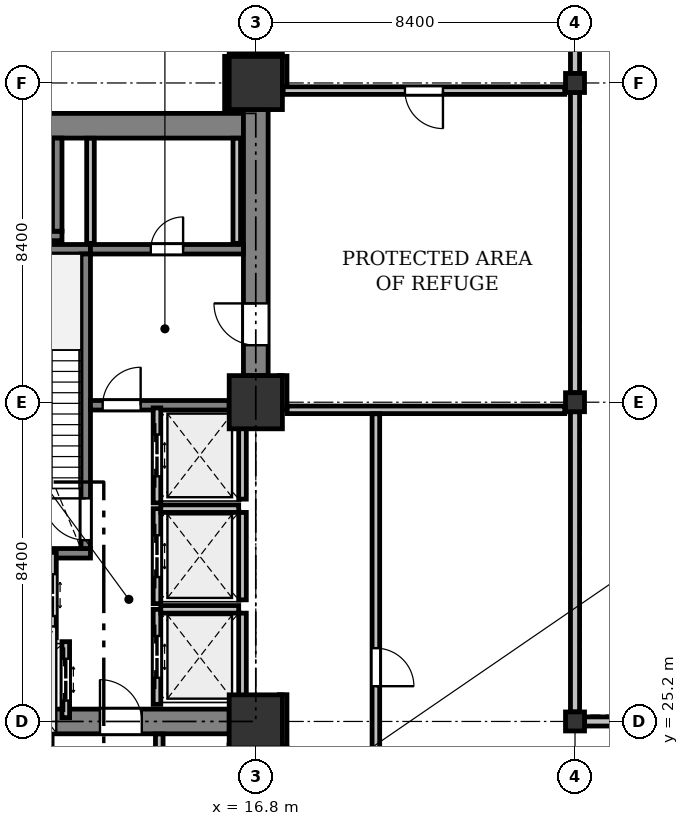
"""IFC4 building model, lengths in metres.
Left out: names, types, materials, properties, quantities, classifications, styles, units other than length and angle.
Written with IfcOpenShell. Run it as: python <this file> out.ifc"""

import sys

from ifc_helpers import new_model, si_unit, direction, frame, frame_2d, origin, origin_2d, place, context, subcontext, project, spatial, rectangle, i_section, extrude, element, fill, save


model = new_model("IFC4")
c1 = context("Model", 3, precision=1e-05, world=origin(), true_north=direction((0.0, 1.0)))
c2 = subcontext(c1, "Body", "Model", "MODEL_VIEW")
j1 = project(units=[si_unit("LENGTHUNIT", "METRE"), si_unit("PLANEANGLEUNIT", "RADIAN")], contexts=[c1])
p1 = place(None, origin())
s1 = spatial("IfcSite", under=j1, at=p1, CompositionType="ELEMENT")
p2 = place(p1, origin())
s2 = spatial("IfcBuilding", under=s1, at=p2, CompositionType="ELEMENT")
p3 = place(p2, frame((0.0, 0.0, 79.4)))
s3 = spatial("IfcBuildingStorey", under=s2, at=p3, CompositionType="ELEMENT", Elevation=79.4)
for number, where, z_axis, x_axis in (
    (1, (16.8, 25.2, 0.0), (0.0, 0.0, 1.0), (1.0, 0.0, 0.0)),
    (2, (16.8, 33.6, 0.0), (0.0, 0.0, 1.0), (1.0, 0.0, 0.0)),
    (3, (16.8, 42.0, 0.0), (0.0, 0.0, 1.0), (1.0, 0.0, 0.0)),
):
    element("IfcColumn", number, at=place(p3, frame(where, z_axis=z_axis, x_axis=x_axis)), inside=s3, PredefinedType="COLUMN", context=c2, shape_type="SweptSolid", body=[
        extrude(rectangle(XDim=1.4, YDim=1.4, at=origin_2d()), origin(), (0.0, 0.0, 1.0), 5.0),
    ])
for number, where, z_axis, x_axis in (
    (4, (25.2, 25.2, 0.0), (0.0, 0.0, 1.0), (1.0, 0.0, 0.0)),
    (5, (25.2, 33.6, 0.0), (0.0, 0.0, 1.0), (1.0, 0.0, 0.0)),
    (6, (25.2, 42.0, 0.0), (0.0, 0.0, 1.0), (1.0, 0.0, 0.0)),
):
    element("IfcColumn", number, at=place(p3, frame(where, z_axis=z_axis, x_axis=x_axis)), inside=s3, PredefinedType="COLUMN", context=c2, shape_type="SweptSolid", body=[
        extrude(i_section(OverallWidth=0.5, OverallDepth=0.5, WebThickness=0.028, FlangeThickness=0.04, at=origin_2d()), origin(), (0.0, 0.0, 1.0), 5.0),
    ])
p4 = place(p3, frame((25.2, 46.08, 0.0), z_axis=(0.0, 0.0, 1.0), x_axis=(0.0, -1.0, 0.0)))
e7 = element("IfcWall", 7, at=p4, inside=s3, PredefinedType="STANDARD", context=c2, shape_type="SweptSolid", body=[
    extrude(rectangle(XDim=3.83, YDim=0.24, at=frame_2d((1.915, 0.0))), origin(), (0.0, 0.0, 1.0), 4.725),
])
p5 = place(p3, frame((25.2, 41.75, 0.0), z_axis=(0.0, 0.0, 1.0), x_axis=(0.0, -1.0, 0.0)))
e8 = element("IfcWall", 8, at=p5, inside=s3, PredefinedType="STANDARD", context=c2, shape_type="SweptSolid", body=[
    extrude(rectangle(XDim=7.9, YDim=0.24, at=frame_2d((3.95, 0.0))), origin(), (0.0, 0.0, 1.0), 3.709),
])
p6 = place(p3, frame((25.2, 33.35, 0.0), z_axis=(0.0, 0.0, 1.0), x_axis=(0.0, -1.0, 0.0)))
e9 = element("IfcWall", 9, at=p6, inside=s3, PredefinedType="STANDARD", context=c2, shape_type="SweptSolid", body=[
    extrude(rectangle(XDim=7.9, YDim=0.24, at=frame_2d((3.95, 0.0))), origin(), (0.0, 0.0, 1.0), 3.709),
])
p7 = place(p3, frame((25.45, 25.2, 0.0), z_axis=(0.0, 0.0, 1.0), x_axis=(1.0, 0.0, 0.0)))
e10 = element("IfcWall", 10, at=p7, inside=s3, PredefinedType="STANDARD", context=c2, shape_type="SweptSolid", body=[
    extrude(rectangle(XDim=7.9, YDim=0.24, at=frame_2d((3.95, 0.0))), origin(), (0.0, 0.0, 1.0), 3.825),
])
p8 = place(p3, frame((8.725, 40.875, 0.0), z_axis=(0.0, 0.0, 1.0), x_axis=(1.0, 0.0, 0.0)))
e11 = element("IfcWall", 11, at=p8, inside=s3, PredefinedType="SHEAR", context=c2, shape_type="SweptSolid", body=[
    extrude(rectangle(XDim=7.75, YDim=0.65, at=frame_2d((3.875, 0.0))), origin(), (0.0, 0.0, 1.0), 4.725),
])
p9 = place(p3, frame((16.8, 34.3, 0.0), z_axis=(0.0, 0.0, 1.0), x_axis=(0.0, 1.0, 0.0)))
e12 = element("IfcWall", 12, at=p9, inside=s3, PredefinedType="SHEAR", context=c2, shape_type="SweptSolid", body=[
    extrude(rectangle(XDim=7.0, YDim=0.65, at=frame_2d((3.5, 0.0))), origin(), (0.0, 0.0, 1.0), 4.725),
])
p10 = place(p9, frame((0.8, 0.0, 0.0)))
e13 = element("IfcOpeningElement", 13, at=p10, cuts=e12, PredefinedType="OPENING", context=c2, shape_type="SweptSolid", body=[
    extrude(rectangle(XDim=1.1, YDim=2.15, at=frame_2d((0.55, 1.075))), frame((0.0, 0.335, 0.0), z_axis=(0.0, -1.0, 0.0), x_axis=(1.0, 0.0, 0.0)), (0.0, 0.0, 1.0), 0.67),
])
p11 = place(p3, frame((9.1, 25.2, 0.0), z_axis=(0.0, 0.0, 1.0), x_axis=(1.0, 0.0, 0.0)))
e14 = element("IfcWall", 14, at=p11, inside=s3, PredefinedType="SHEAR", context=c2, shape_type="SweptSolid", body=[
    extrude(rectangle(XDim=7.0, YDim=0.65, at=frame_2d((3.5, 0.0))), origin(), (0.0, 0.0, 1.0), 4.725),
])
p12 = place(p11, frame((3.6, 0.0, 0.0)))
e15 = element("IfcOpeningElement", 15, at=p12, cuts=e14, PredefinedType="OPENING", context=c2, shape_type="SweptSolid", body=[
    extrude(rectangle(XDim=1.1, YDim=2.15, at=frame_2d((0.55, 1.075))), frame((0.0, 0.335, 0.0), z_axis=(0.0, -1.0, 0.0), x_axis=(1.0, 0.0, 0.0)), (0.0, 0.0, 1.0), 0.67),
])
for number, where, z_axis, x_axis in (
    (16, (12.45, 29.625, 0.0), (0.0, 0.0, 1.0), (-1.0, 0.0, 0.0)),
    (17, (12.45, 37.625, 0.0), (0.0, 0.0, 1.0), (-1.0, 0.0, 0.0)),
):
    element("IfcWall", number, at=place(p3, frame(where, z_axis=z_axis, x_axis=x_axis)), inside=s3, PredefinedType="SHEAR", context=c2, shape_type="SweptSolid", body=[
        extrude(rectangle(XDim=3.75, YDim=0.25, at=frame_2d((1.875, 0.0))), origin(), (0.0, 0.0, 1.0), 4.725),
    ])
p13 = place(p3, frame((12.325, 29.75, 0.0), z_axis=(0.0, 0.0, 1.0), x_axis=(0.0, 1.0, 0.0)))
e18 = element("IfcWall", 18, at=p13, inside=s3, PredefinedType="SHEAR", context=c2, shape_type="SweptSolid", body=[
    extrude(rectangle(XDim=7.75, YDim=0.25, at=frame_2d((3.875, 0.0))), origin(), (0.0, 0.0, 1.0), 4.725),
])
p14 = place(p13, frame((0.22, 0.0, 0.0)))
e19 = element("IfcOpeningElement", 19, at=p14, cuts=e18, PredefinedType="OPENING", context=c2, shape_type="SweptSolid", body=[
    extrude(rectangle(XDim=1.1, YDim=2.15, at=frame_2d((0.55, 1.075))), frame((0.0, 0.135, 0.0), z_axis=(0.0, -1.0, 0.0), x_axis=(1.0, 0.0, 0.0)), (0.0, 0.0, 1.0), 0.27),
])
p15 = place(p3, frame((8.725, 37.975, 0.0), z_axis=(0.0, 0.0, 1.0), x_axis=(1.0, 0.0, 0.0)))
e20 = element("IfcWall", 20, at=p15, inside=s3, PredefinedType="SHEAR", context=c2, shape_type="SweptSolid", body=[
    extrude(rectangle(XDim=2.975, YDim=0.25, at=frame_2d((1.487, 0.0))), origin(), (0.0, 0.0, 1.0), 4.725),
])
p16 = place(p3, frame((11.575, 38.1, 0.0), z_axis=(0.0, 0.0, 1.0), x_axis=(0.0, 1.0, 0.0)))
e21 = element("IfcWall", 21, at=p16, inside=s3, PredefinedType="SHEAR", context=c2, shape_type="SweptSolid", body=[
    extrude(rectangle(XDim=2.45, YDim=0.25, at=frame_2d((1.225, 0.0))), origin(), (0.0, 0.0, 1.0), 4.725),
])
p17 = place(p3, frame((12.45, 33.52, 0.0), z_axis=(0.0, 0.0, 1.0), x_axis=(1.0, 0.0, 0.0)))
e22 = element("IfcWall", 22, at=p17, inside=s3, PredefinedType="SHEAR", context=c2, shape_type="SweptSolid", body=[
    extrude(rectangle(XDim=3.65, YDim=0.25, at=frame_2d((1.825, 0.0))), origin(), (0.0, 0.0, 1.0), 4.725),
])
p18 = place(p17, frame((0.32, 0.0, 0.0)))
e23 = element("IfcOpeningElement", 23, at=p18, cuts=e22, PredefinedType="OPENING", context=c2, shape_type="SweptSolid", body=[
    extrude(rectangle(XDim=1.0, YDim=2.15, at=frame_2d((0.5, 1.075))), frame((0.0, 0.135, 0.0), z_axis=(0.0, -1.0, 0.0), x_axis=(1.0, 0.0, 0.0)), (0.0, 0.0, 1.0), 0.27),
])
p19 = place(p3, frame((12.45, 37.625, 0.0), z_axis=(0.0, 0.0, 1.0), x_axis=(1.0, 0.0, 0.0)))
e24 = element("IfcWall", 24, at=p19, inside=s3, PredefinedType="SHEAR", context=c2, shape_type="SweptSolid", body=[
    extrude(rectangle(XDim=4.025, YDim=0.25, at=frame_2d((2.013, 0.0))), origin(), (0.0, 0.0, 1.0), 4.725),
])
p20 = place(p19, frame((1.587, 0.0, 0.0)))
e25 = element("IfcOpeningElement", 25, at=p20, cuts=e24, PredefinedType="OPENING", context=c2, shape_type="SweptSolid", body=[
    extrude(rectangle(XDim=0.85, YDim=2.15, at=frame_2d((0.425, 1.075))), frame((0.0, 0.135, 0.0), z_axis=(0.0, -1.0, 0.0), x_axis=(1.0, 0.0, 0.0)), (0.0, 0.0, 1.0), 0.27),
])
p21 = place(p3, frame((11.45, 27.4, 0.0), z_axis=(0.0, 0.0, 1.0), x_axis=(0.0, 1.0, 0.0)))
e26 = element("IfcWall", 26, at=p21, inside=s3, PredefinedType="PARTITIONING", context=c2, shape_type="SweptSolid", body=[
    extrude(rectangle(XDim=2.25, YDim=0.2, at=frame_2d((1.125, 0.0))), origin(), (0.0, 0.0, 1.0), 4.725),
])
p22 = place(p21, frame((0.575, 0.0, 0.0)))
e27 = element("IfcOpeningElement", 27, at=p22, cuts=e26, PredefinedType="OPENING", context=c2, shape_type="SweptSolid", body=[
    extrude(rectangle(XDim=1.1, YDim=2.2, at=frame_2d((0.55, 1.1))), frame((0.0, 0.11, 0.0), z_axis=(0.0, -1.0, 0.0), x_axis=(1.0, 0.0, 0.0)), (0.0, 0.0, 1.0), 0.22),
])
p23 = place(p3, frame((11.8, 25.3, 0.0), z_axis=(0.0, 0.0, 1.0), x_axis=(0.0, 1.0, 0.0)))
e28 = element("IfcWall", 28, at=p23, inside=s3, PredefinedType="PARTITIONING", context=c2, shape_type="SweptSolid", body=[
    extrude(rectangle(XDim=2.0, YDim=0.2, at=frame_2d((1.0, 0.0))), origin(), (0.0, 0.0, 1.0), 4.725),
])
p24 = place(p23, frame((0.45, 0.0, 0.0)))
e29 = element("IfcOpeningElement", 29, at=p24, cuts=e28, PredefinedType="OPENING", context=c2, shape_type="SweptSolid", body=[
    extrude(rectangle(XDim=1.1, YDim=2.2, at=frame_2d((0.55, 1.1))), frame((0.0, 0.11, 0.0), z_axis=(0.0, -1.0, 0.0), x_axis=(1.0, 0.0, 0.0)), (0.0, 0.0, 1.0), 0.22),
])
p25 = place(p3, frame((14.2, 25.65, 0.0), z_axis=(0.0, 0.0, 1.0), x_axis=(0.0, 1.0, 0.0)))
e30 = element("IfcWall", 30, at=p25, inside=s3, PredefinedType="PARTITIONING", context=c2, shape_type="SweptSolid", body=[
    extrude(rectangle(XDim=2.5, YDim=0.2, at=frame_2d((1.25, 0.0))), origin(), (0.0, 0.0, 1.0), 4.725),
])
p26 = place(p25, frame((0.7, 0.0, 0.0)))
e31 = element("IfcOpeningElement", 31, at=p26, cuts=e30, PredefinedType="OPENING", context=c2, shape_type="SweptSolid", body=[
    extrude(rectangle(XDim=1.1, YDim=2.2, at=frame_2d((0.55, 1.1))), frame((0.0, 0.11, 0.0), z_axis=(0.0, -1.0, 0.0), x_axis=(1.0, 0.0, 0.0)), (0.0, 0.0, 1.0), 0.22),
])
p27 = place(p3, frame((16.45, 25.75, 0.0), z_axis=(0.0, 0.0, 1.0), x_axis=(0.0, 1.0, 0.0)))
e32 = element("IfcWall", 32, at=p27, inside=s3, PredefinedType="PARTITIONING", context=c2, shape_type="SweptSolid", body=[
    extrude(rectangle(XDim=2.3, YDim=0.2, at=frame_2d((1.15, 0.0))), origin(), (0.0, 0.0, 1.0), 4.725),
])
p28 = place(p3, frame((14.3, 28.15, 0.0), z_axis=(0.0, 0.0, 1.0), x_axis=(1.0, 0.0, 0.0)))
e33 = element("IfcWall", 33, at=p28, inside=s3, PredefinedType="PARTITIONING", context=c2, shape_type="SweptSolid", body=[
    extrude(rectangle(XDim=2.05, YDim=0.2, at=frame_2d((1.025, 0.0))), origin(), (0.0, 0.0, 1.0), 4.725),
])
p29 = place(p3, frame((14.2, 28.3, 0.0), z_axis=(0.0, 0.0, 1.0), x_axis=(0.0, 1.0, 0.0)))
e34 = element("IfcWall", 34, at=p29, inside=s3, PredefinedType="PARTITIONING", context=c2, shape_type="SweptSolid", body=[
    extrude(rectangle(XDim=2.5, YDim=0.2, at=frame_2d((1.25, 0.0))), origin(), (0.0, 0.0, 1.0), 4.725),
])
p30 = place(p29, frame((0.7, 0.0, 0.0)))
e35 = element("IfcOpeningElement", 35, at=p30, cuts=e34, PredefinedType="OPENING", context=c2, shape_type="SweptSolid", body=[
    extrude(rectangle(XDim=1.1, YDim=2.2, at=frame_2d((0.55, 1.1))), frame((0.0, 0.11, 0.0), z_axis=(0.0, -1.0, 0.0), x_axis=(1.0, 0.0, 0.0)), (0.0, 0.0, 1.0), 0.22),
])
p31 = place(p3, frame((16.45, 28.4, 0.0), z_axis=(0.0, 0.0, 1.0), x_axis=(0.0, 1.0, 0.0)))
e36 = element("IfcWall", 36, at=p31, inside=s3, PredefinedType="PARTITIONING", context=c2, shape_type="SweptSolid", body=[
    extrude(rectangle(XDim=2.3, YDim=0.2, at=frame_2d((1.15, 0.0))), origin(), (0.0, 0.0, 1.0), 4.725),
])
p32 = place(p3, frame((14.3, 30.8, 0.0), z_axis=(0.0, 0.0, 1.0), x_axis=(1.0, 0.0, 0.0)))
e37 = element("IfcWall", 37, at=p32, inside=s3, PredefinedType="PARTITIONING", context=c2, shape_type="SweptSolid", body=[
    extrude(rectangle(XDim=2.05, YDim=0.2, at=frame_2d((1.025, 0.0))), origin(), (0.0, 0.0, 1.0), 4.725),
])
p33 = place(p3, frame((14.2, 30.95, 0.0), z_axis=(0.0, 0.0, 1.0), x_axis=(0.0, 1.0, 0.0)))
e38 = element("IfcWall", 38, at=p33, inside=s3, PredefinedType="PARTITIONING", context=c2, shape_type="SweptSolid", body=[
    extrude(rectangle(XDim=2.5, YDim=0.2, at=frame_2d((1.25, 0.0))), origin(), (0.0, 0.0, 1.0), 4.725),
])
p34 = place(p33, frame((0.7, 0.0, 0.0)))
e39 = element("IfcOpeningElement", 39, at=p34, cuts=e38, PredefinedType="OPENING", context=c2, shape_type="SweptSolid", body=[
    extrude(rectangle(XDim=1.1, YDim=2.2, at=frame_2d((0.55, 1.1))), frame((0.0, 0.11, 0.0), z_axis=(0.0, -1.0, 0.0), x_axis=(1.0, 0.0, 0.0)), (0.0, 0.0, 1.0), 0.22),
])
p35 = place(p3, frame((16.45, 31.05, 0.0), z_axis=(0.0, 0.0, 1.0), x_axis=(0.0, 1.0, 0.0)))
e40 = element("IfcWall", 40, at=p35, inside=s3, PredefinedType="PARTITIONING", context=c2, shape_type="SweptSolid", body=[
    extrude(rectangle(XDim=2.3, YDim=0.2, at=frame_2d((1.15, 0.0))), origin(), (0.0, 0.0, 1.0), 4.725),
])
for number, where, z_axis, x_axis in (
    (41, (16.3, 37.78, 0.0), (0.0, 0.0, 1.0), (0.0, 1.0, 0.0)),
    (42, (12.45, 40.546, 0.0), (0.0, 0.0, 1.0), (0.0, -1.0, 0.0)),
):
    element("IfcWall", number, at=place(p3, frame(where, z_axis=z_axis, x_axis=x_axis)), inside=s3, PredefinedType="PARTITIONING", context=c2, shape_type="SweptSolid", body=[
        extrude(rectangle(XDim=2.766, YDim=0.2, at=frame_2d((1.383, 0.0))), origin(), (0.0, 0.0, 1.0), 3.625),
    ])
p36 = place(p3, frame((17.52, 34.3, 0.0), z_axis=(0.0, 0.0, 1.0), x_axis=(0.0, -1.0, 0.0)))
e43 = element("IfcWall", 43, at=p36, inside=s3, PredefinedType="PARTITIONING", context=c2, shape_type="SweptSolid", body=[
    extrude(rectangle(XDim=0.9, YDim=0.2, at=frame_2d((0.45, 0.0))), origin(), (0.0, 0.0, 1.0), 3.825),
])
p37 = place(p3, frame((17.624, 33.4, 0.0), z_axis=(0.0, 0.0, 1.0), x_axis=(1.0, 0.0, 0.0)))
e44 = element("IfcWall", 44, at=p37, inside=s3, PredefinedType="PARTITIONING", context=c2, shape_type="SweptSolid", body=[
    extrude(rectangle(XDim=7.306, YDim=0.2, at=frame_2d((3.653, 0.0))), origin(), (0.0, 0.0, 1.0), 3.825),
])
p38 = place(p3, frame((24.93, 41.8, 0.0), z_axis=(0.0, 0.0, 1.0), x_axis=(-1.0, 0.0, 0.0)))
e45 = element("IfcWall", 45, at=p38, inside=s3, PredefinedType="PARTITIONING", context=c2, shape_type="SweptSolid", body=[
    extrude(rectangle(XDim=7.41, YDim=0.2, at=frame_2d((3.705, 0.0))), origin(), (0.0, 0.0, 1.0), 3.825),
])
p39 = place(p38, frame((3.205, 0.0, 0.0)))
e46 = element("IfcOpeningElement", 46, at=p39, cuts=e45, PredefinedType="OPENING", context=c2, shape_type="SweptSolid", body=[
    extrude(rectangle(XDim=1.0, YDim=2.15, at=frame_2d((0.5, 1.075))), frame((0.0, 0.11, 0.0), z_axis=(0.0, -1.0, 0.0), x_axis=(1.0, 0.0, 0.0)), (0.0, 0.0, 1.0), 0.22),
])
p40 = place(p3, frame((16.08, 41.3, 0.0), z_axis=(0.0, 0.0, 1.0), x_axis=(0.0, 1.0, 0.0)))
e47 = element("IfcWall", 47, at=p40, inside=s3, PredefinedType="PARTITIONING", context=c2, shape_type="SweptSolid", body=[
    extrude(rectangle(XDim=1.4, YDim=0.2, at=frame_2d((0.7, 0.0))), origin(), (0.0, 0.0, 1.0), 3.825),
])
p41 = place(p3, frame((16.1, 42.72, 0.0), z_axis=(0.0, 0.0, 1.0), x_axis=(1.0, 0.0, 0.0)))
e48 = element("IfcWall", 48, at=p41, inside=s3, PredefinedType="PARTITIONING", context=c2, shape_type="SweptSolid", body=[
    extrude(rectangle(XDim=1.4, YDim=0.2, at=frame_2d((0.7, 0.0))), origin(), (0.0, 0.0, 1.0), 3.709),
])
p42 = place(p3, frame((17.52, 42.7, 0.0), z_axis=(0.0, 0.0, 1.0), x_axis=(0.0, -1.0, 0.0)))
e49 = element("IfcWall", 49, at=p42, inside=s3, PredefinedType="PARTITIONING", context=c2, shape_type="SweptSolid", body=[
    extrude(rectangle(XDim=0.796, YDim=0.2, at=frame_2d((0.398, 0.0))), origin(), (0.0, 0.0, 1.0), 3.825),
])
p43 = place(p3, frame((19.96, 33.296, 0.0), z_axis=(0.0, 0.0, 1.0), x_axis=(0.0, -1.0, 0.0)))
e50 = element("IfcWall", 50, at=p43, inside=s3, PredefinedType="PARTITIONING", context=c2, shape_type="SweptSolid", body=[
    extrude(rectangle(XDim=13.336, YDim=0.2, at=frame_2d((6.668, 0.0))), origin(), (0.0, 0.0, 1.0), 3.825),
])
p44 = place(p43, frame((6.168, 0.0, 0.0)))
e51 = element("IfcOpeningElement", 51, at=p44, cuts=e50, PredefinedType="OPENING", context=c2, shape_type="SweptSolid", body=[
    extrude(rectangle(XDim=1.0, YDim=2.15, at=frame_2d((0.5, 1.075))), frame((0.0, 0.11, 0.0), z_axis=(0.0, -1.0, 0.0), x_axis=(1.0, 0.0, 0.0)), (0.0, 0.0, 1.0), 0.22),
])
p45 = place(p3, frame((17.52, 25.904, 0.0), z_axis=(0.0, 0.0, 1.0), x_axis=(0.000347826066, -0.999999939509, 0.0)))
e52 = element("IfcWall", 52, at=p45, inside=s3, PredefinedType="PARTITIONING", context=c2, shape_type="SweptSolid", body=[
    extrude(rectangle(XDim=1.404, YDim=0.2, at=frame_2d((0.702, 0.0))), origin(), (0.0, 0.0, 1.0), 3.825),
])
p46 = place(p3, frame((17.5, 24.48, 0.0), z_axis=(0.0, 0.0, 1.0), x_axis=(-0.999999758706, 0.000694685487, 0.0)))
e53 = element("IfcWall", 53, at=p46, inside=s3, PredefinedType="PARTITIONING", context=c2, shape_type="SweptSolid", body=[
    extrude(rectangle(XDim=1.406, YDim=0.2, at=frame_2d((0.703, 0.0))), origin(), (0.0, 0.0, 1.0), 3.709),
])
p47 = place(p3, frame((14.26, 24.871, 0.0), z_axis=(0.0, 0.0, 1.0), x_axis=(0.0, -1.0, 0.0)))
e54 = element("IfcWall", 54, at=p47, inside=s3, PredefinedType="PARTITIONING", context=c2, shape_type="SweptSolid", body=[
    extrude(rectangle(XDim=4.911, YDim=0.2, at=frame_2d((2.456, 0.0))), origin(), (0.0, 0.0, 1.0), 4.725),
])
p48 = place(p47, frame((1.956, 0.0, 0.0)))
e55 = element("IfcOpeningElement", 55, at=p48, cuts=e54, PredefinedType="OPENING", context=c2, shape_type="SweptSolid", body=[
    extrude(rectangle(XDim=1.0, YDim=2.15, at=frame_2d((0.5, 1.075))), frame((0.0, 0.11, 0.0), z_axis=(0.0, -1.0, 0.0), x_axis=(1.0, 0.0, 0.0)), (0.0, 0.0, 1.0), 0.22),
])
p49 = place(p10, origin())
e56 = element("IfcDoor", 56, at=p49, inside=s3, OperationType="SINGLE_SWING_RIGHT", PredefinedType="DOOR", context=c2, shape_type="SweptSolid", body=[
    extrude(rectangle(XDim=1.1, YDim=2.15, at=frame_2d((0.55, 1.075))), frame((0.0, 0.025, 0.0), z_axis=(0.0, -1.0, 0.0), x_axis=(1.0, 0.0, 0.0)), (0.0, 0.0, 1.0), 0.05),
])
fill(e13, e56)
p50 = place(p12, origin())
e57 = element("IfcDoor", 57, at=p50, inside=s3, OperationType="SINGLE_SWING_LEFT", PredefinedType="DOOR", context=c2, shape_type="SweptSolid", body=[
    extrude(rectangle(XDim=1.1, YDim=2.15, at=frame_2d((0.55, 1.075))), frame((0.0, 0.025, 0.0), z_axis=(0.0, -1.0, 0.0), x_axis=(1.0, 0.0, 0.0)), (0.0, 0.0, 1.0), 0.05),
])
fill(e15, e57)
p51 = place(p14, origin())
e58 = element("IfcDoor", 58, at=p51, inside=s3, OperationType="SINGLE_SWING_RIGHT", PredefinedType="DOOR", context=c2, shape_type="SweptSolid", body=[
    extrude(rectangle(XDim=1.1, YDim=2.15, at=frame_2d((0.55, 1.075))), frame((0.0, 0.025, 0.0), z_axis=(0.0, -1.0, 0.0), x_axis=(1.0, 0.0, 0.0)), (0.0, 0.0, 1.0), 0.05),
])
fill(e19, e58)
p52 = place(p18, origin())
e59 = element("IfcDoor", 59, at=p52, inside=s3, OperationType="SINGLE_SWING_RIGHT", PredefinedType="DOOR", context=c2, shape_type="SweptSolid", body=[
    extrude(rectangle(XDim=1.0, YDim=2.15, at=frame_2d((0.5, 1.075))), frame((0.0, 0.025, 0.0), z_axis=(0.0, -1.0, 0.0), x_axis=(1.0, 0.0, 0.0)), (0.0, 0.0, 1.0), 0.05),
])
fill(e23, e59)
p53 = place(p22, origin())
e60 = element("IfcDoor", 60, at=p53, inside=s3, OperationType="DOUBLE_DOOR_SLIDING", PredefinedType="DOOR", context=c2, shape_type="SweptSolid", body=[
    extrude(rectangle(XDim=1.1, YDim=2.2, at=frame_2d((0.55, 1.1))), frame((0.0, 0.025, 0.0), z_axis=(0.0, -1.0, 0.0), x_axis=(1.0, 0.0, 0.0)), (0.0, 0.0, 1.0), 0.05),
])
fill(e27, e60)
p54 = place(p24, origin())
e61 = element("IfcDoor", 61, at=p54, inside=s3, OperationType="DOUBLE_DOOR_SLIDING", PredefinedType="DOOR", context=c2, shape_type="SweptSolid", body=[
    extrude(rectangle(XDim=1.1, YDim=2.2, at=frame_2d((0.55, 1.1))), frame((0.0, 0.025, 0.0), z_axis=(0.0, -1.0, 0.0), x_axis=(1.0, 0.0, 0.0)), (0.0, 0.0, 1.0), 0.05),
])
fill(e29, e61)
p55 = place(p26, origin())
e62 = element("IfcDoor", 62, at=p55, inside=s3, OperationType="DOUBLE_DOOR_SLIDING", PredefinedType="DOOR", context=c2, shape_type="SweptSolid", body=[
    extrude(rectangle(XDim=1.1, YDim=2.2, at=frame_2d((0.55, 1.1))), frame((0.0, 0.025, 0.0), z_axis=(0.0, -1.0, 0.0), x_axis=(1.0, 0.0, 0.0)), (0.0, 0.0, 1.0), 0.05),
])
fill(e31, e62)
p56 = place(p30, origin())
e63 = element("IfcDoor", 63, at=p56, inside=s3, OperationType="DOUBLE_DOOR_SLIDING", PredefinedType="DOOR", context=c2, shape_type="SweptSolid", body=[
    extrude(rectangle(XDim=1.1, YDim=2.2, at=frame_2d((0.55, 1.1))), frame((0.0, 0.025, 0.0), z_axis=(0.0, -1.0, 0.0), x_axis=(1.0, 0.0, 0.0)), (0.0, 0.0, 1.0), 0.05),
])
fill(e35, e63)
p57 = place(p34, origin())
e64 = element("IfcDoor", 64, at=p57, inside=s3, OperationType="DOUBLE_DOOR_SLIDING", PredefinedType="DOOR", context=c2, shape_type="SweptSolid", body=[
    extrude(rectangle(XDim=1.1, YDim=2.2, at=frame_2d((0.55, 1.1))), frame((0.0, 0.025, 0.0), z_axis=(0.0, -1.0, 0.0), x_axis=(1.0, 0.0, 0.0)), (0.0, 0.0, 1.0), 0.05),
])
fill(e39, e64)
p58 = place(p20, origin())
e65 = element("IfcDoor", 65, at=p58, inside=s3, OperationType="SINGLE_SWING_RIGHT", PredefinedType="DOOR", context=c2, shape_type="SweptSolid", body=[
    extrude(rectangle(XDim=0.85, YDim=2.15, at=frame_2d((0.425, 1.075))), frame((0.0, 0.025, 0.0), z_axis=(0.0, -1.0, 0.0), x_axis=(1.0, 0.0, 0.0)), (0.0, 0.0, 1.0), 0.05),
])
fill(e25, e65)
p59 = place(p39, origin())
e66 = element("IfcDoor", 66, at=p59, inside=s3, OperationType="SINGLE_SWING_LEFT", PredefinedType="DOOR", context=c2, shape_type="SweptSolid", body=[
    extrude(rectangle(XDim=1.0, YDim=2.15, at=frame_2d((0.5, 1.075))), frame((0.0, 0.025, 0.0), z_axis=(0.0, -1.0, 0.0), x_axis=(1.0, 0.0, 0.0)), (0.0, 0.0, 1.0), 0.05),
])
fill(e46, e66)
p60 = place(p44, origin())
e67 = element("IfcDoor", 67, at=p60, inside=s3, OperationType="SINGLE_SWING_RIGHT", PredefinedType="DOOR", context=c2, shape_type="SweptSolid", body=[
    extrude(rectangle(XDim=1.0, YDim=2.15, at=frame_2d((0.5, 1.075))), frame((0.0, 0.025, 0.0), z_axis=(0.0, -1.0, 0.0), x_axis=(1.0, 0.0, 0.0)), (0.0, 0.0, 1.0), 0.05),
])
fill(e51, e67)
save(model, sys.argv[1])
